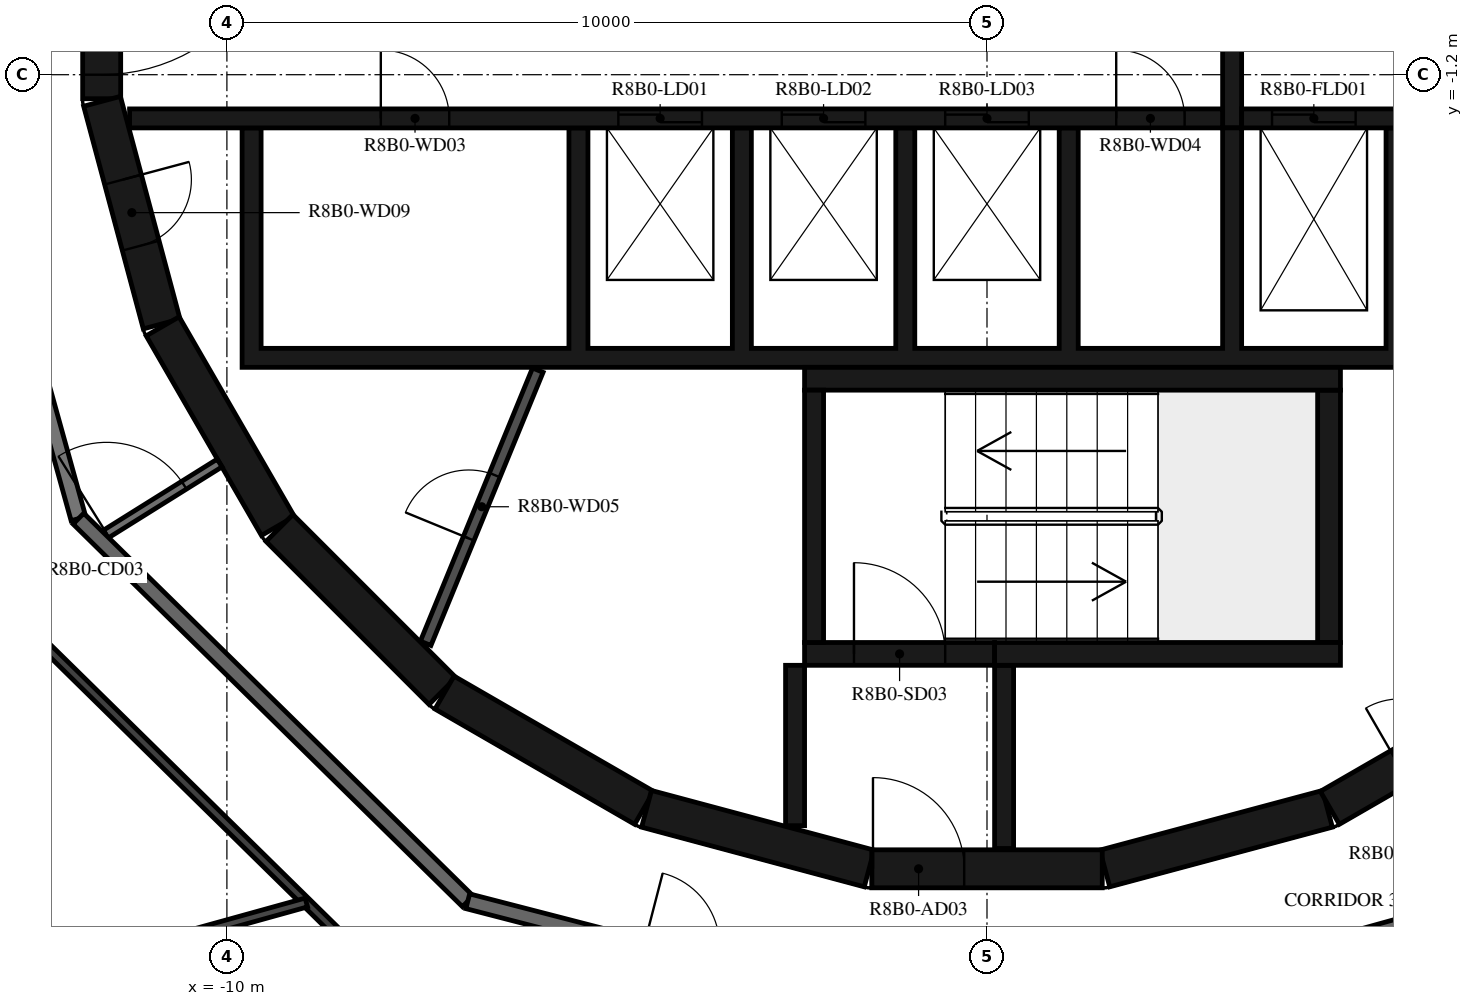
"""IFC4 building model, lengths in metres.
Left out: names, types, materials, properties, quantities, classifications, styles, units other than length and angle.
Written with IfcOpenShell. Run it as: python <this file> out.ifc"""

import sys

from ifc_helpers import new_model, si_unit, direction, frame, frame_2d, origin, place, context, subcontext, project, spatial, polyline, rectangle, outline, extrude, element, fill, save


model = new_model("IFC4")
c1 = context("Model", 3, precision=1e-05, world=origin(), true_north=direction((0.0, 1.0)))
c2 = subcontext(c1, "Body", "Model", "MODEL_VIEW")
j1 = project(units=[si_unit("LENGTHUNIT", "METRE"), si_unit("PLANEANGLEUNIT", "RADIAN")], contexts=[c1])
p1 = place(None, origin())
s1 = spatial("IfcSite", under=j1, at=p1, CompositionType="ELEMENT")
p2 = place(p1, origin())
s2 = spatial("IfcBuilding", under=s1, at=p2, CompositionType="ELEMENT")
p3 = place(p2, frame((0.0, 0.0, 312.2)))
s3 = spatial("IfcBuildingStorey", under=s2, at=p3, CompositionType="ELEMENT", Elevation=312.2)
p4 = place(p3, frame((1.55, -11.643, 0.0), z_axis=(0.0, 0.0, 1.0), x_axis=(0.965948410781, 0.258734743916, 0.0)))
e1 = element("IfcWall", 1, at=p4, inside=s3, PredefinedType="SHEAR", context=c2, shape_type="SweptSolid", body=[
    extrude(rectangle(XDim=3.033, YDim=0.5, at=frame_2d((1.516, 0.0))), origin(), (0.0, 0.0, 1.0), 3.12),
])
p5 = place(p3, frame((4.51, -10.845, 0.0), z_axis=(0.0, 0.0, 1.0), x_axis=(0.865975092491, 0.500087131594, 0.0)))
e2 = element("IfcWall", 2, at=p5, inside=s3, PredefinedType="SHEAR", context=c2, shape_type="SweptSolid", body=[
    extrude(rectangle(XDim=3.033, YDim=0.5, at=frame_2d((1.516, 0.0))), origin(), (0.0, 0.0, 1.0), 3.12),
])
p6 = place(p5, frame((1.066, 0.0, 0.0)))
e3 = element("IfcOpeningElement", 3, at=p6, cuts=e2, PredefinedType="OPENING", context=c2, shape_type="SweptSolid", body=[
    extrude(rectangle(XDim=0.9, YDim=2.1, at=frame_2d((0.45, 1.05))), frame((0.0, 0.26, 0.0), z_axis=(0.0, -1.0, 0.0), x_axis=(1.0, 0.0, 0.0)), (0.0, 0.0, 1.0), 0.52),
])
p7 = place(p3, frame((-11.647, 1.516, 0.0), z_axis=(0.0, 0.0, 1.0), x_axis=(0.0, -1.0, 0.0)))
e4 = element("IfcWall", 4, at=p7, inside=s3, PredefinedType="SHEAR", context=c2, shape_type="SweptSolid", body=[
    extrude(rectangle(XDim=3.033, YDim=0.5, at=frame_2d((1.516, 0.0))), origin(), (0.0, 0.0, 1.0), 3.12),
])
p8 = place(p7, frame((0.316, 0.0, 0.0)))
e5 = element("IfcOpeningElement", 5, at=p8, cuts=e4, PredefinedType="OPENING", context=c2, shape_type="SweptSolid", body=[
    extrude(rectangle(XDim=2.4, YDim=2.1, at=frame_2d((1.2, 1.05))), frame((0.0, 0.26, 0.0), z_axis=(0.0, -1.0, 0.0), x_axis=(1.0, 0.0, 0.0)), (0.0, 0.0, 1.0), 0.52),
])
p9 = place(p3, frame((-11.643, -1.55, 0.0), z_axis=(0.0, 0.0, 1.0), x_axis=(0.258734743916, -0.965948410781, 0.0)))
e6 = element("IfcWall", 6, at=p9, inside=s3, PredefinedType="SHEAR", context=c2, shape_type="SweptSolid", body=[
    extrude(rectangle(XDim=3.033, YDim=0.5, at=frame_2d((1.516, 0.0))), origin(), (0.0, 0.0, 1.0), 3.12),
])
p10 = place(p9, frame((1.066, 0.0, 0.0)))
e7 = element("IfcOpeningElement", 7, at=p10, cuts=e6, PredefinedType="OPENING", context=c2, shape_type="SweptSolid", body=[
    extrude(rectangle(XDim=0.9, YDim=2.1, at=frame_2d((0.45, 1.05))), frame((0.0, 0.26, 0.0), z_axis=(0.0, -1.0, 0.0), x_axis=(1.0, 0.0, 0.0)), (0.0, 0.0, 1.0), 0.52),
])
p11 = place(p3, frame((-10.845, -4.51, 0.0), z_axis=(0.0, 0.0, 1.0), x_axis=(0.500087131594, -0.865975092491, 0.0)))
e8 = element("IfcWall", 8, at=p11, inside=s3, PredefinedType="SHEAR", context=c2, shape_type="SweptSolid", body=[
    extrude(rectangle(XDim=3.033, YDim=0.5, at=frame_2d((1.516, 0.0))), origin(), (0.0, 0.0, 1.0), 3.12),
])
p12 = place(p3, frame((-9.308, -7.164, 0.0), z_axis=(0.0, 0.0, 1.0), x_axis=(0.707106781187, -0.707106781187, 0.0)))
e9 = element("IfcWall", 9, at=p12, inside=s3, PredefinedType="SHEAR", context=c2, shape_type="SweptSolid", body=[
    extrude(rectangle(XDim=3.032, YDim=0.5, at=frame_2d((1.516, 0.0))), origin(), (0.0, 0.0, 1.0), 3.12),
])
for number, where, z_axis, x_axis in (
    (10, (-7.137, -9.329, 0.0), (0.0, 0.0, 1.0), (0.866, -0.5, 0.0)),
    (11, (-4.479, -10.858, 0.0), (0.0, 0.0, 1.0), (0.966, -0.259, 0.0)),
):
    element("IfcWall", number, at=place(p3, frame(where, z_axis=z_axis, x_axis=x_axis)), inside=s3, PredefinedType="SHEAR", context=c2, shape_type="SweptSolid", body=[
        extrude(rectangle(XDim=3.033, YDim=0.5, at=frame_2d((1.516, 0.0))), origin(), (0.0, 0.0, 1.0), 3.12),
    ])
p13 = place(p3, frame((-1.516, -11.647, 0.0), z_axis=(0.0, 0.0, 1.0), x_axis=(1.0, 0.0, 0.0)))
e12 = element("IfcWall", 12, at=p13, inside=s3, PredefinedType="SHEAR", context=c2, shape_type="SweptSolid", body=[
    extrude(rectangle(XDim=3.033, YDim=0.5, at=frame_2d((1.516, 0.0))), origin(), (0.0, 0.0, 1.0), 3.12),
])
p14 = place(p13, frame((0.016, 0.0, 0.0)))
e13 = element("IfcOpeningElement", 13, at=p14, cuts=e12, PredefinedType="OPENING", context=c2, shape_type="SweptSolid", body=[
    extrude(rectangle(XDim=1.2, YDim=2.1, at=frame_2d((0.6, 1.05))), frame((0.0, 0.26, 0.0), z_axis=(0.0, -1.0, 0.0), x_axis=(1.0, 0.0, 0.0)), (0.0, 0.0, 1.0), 0.52),
])
p15 = place(p3, frame((-2.275, -8.67, 0.0), z_axis=(0.0, 0.0, 1.0), x_axis=(0.0, 1.0, 0.0)))
e14 = element("IfcWall", 14, at=p15, inside=s3, PredefinedType="SHEAR", context=c2, shape_type="SweptSolid", body=[
    extrude(rectangle(XDim=3.32, YDim=0.25, at=frame_2d((1.66, 0.0))), origin(), (0.0, 0.0, 1.0), 3.12),
])
p16 = place(p3, frame((-2.4, -5.2, 0.0), z_axis=(0.0, 0.0, 1.0), x_axis=(1.0, 0.0, 0.0)))
e15 = element("IfcWall", 15, at=p16, inside=s3, PredefinedType="SHEAR", context=c2, shape_type="SweptSolid", body=[
    extrude(rectangle(XDim=7.05, YDim=0.3, at=frame_2d((3.525, 0.0))), origin(), (0.0, 0.0, 1.0), 3.12),
])
p17 = place(p3, frame((4.5, -8.67, 0.0), z_axis=(0.0, 0.0, 1.0), x_axis=(0.0, 1.0, 0.0)))
e16 = element("IfcWall", 16, at=p17, inside=s3, PredefinedType="SHEAR", context=c2, shape_type="SweptSolid", body=[
    extrude(rectangle(XDim=3.32, YDim=0.3, at=frame_2d((1.66, 0.0))), origin(), (0.0, 0.0, 1.0), 3.12),
])
p18 = place(p3, frame((0.1, -8.82, 0.0), z_axis=(0.0, 0.0, 1.0), x_axis=(1.0, 0.0, 0.0)))
e17 = element("IfcWall", 17, at=p18, inside=s3, PredefinedType="SHEAR", context=c2, shape_type="SweptSolid", body=[
    extrude(rectangle(XDim=4.55, YDim=0.3, at=frame_2d((2.275, 0.0))), origin(), (0.0, 0.0, 1.0), 3.12),
])
p19 = place(p3, frame((-2.4, -8.82, 0.0), z_axis=(0.0, 0.0, 1.0), x_axis=(1.0, 0.0, 0.0)))
e18 = element("IfcWall", 18, at=p19, inside=s3, PredefinedType="SHEAR", context=c2, shape_type="SweptSolid", body=[
    extrude(rectangle(XDim=2.5, YDim=0.3, at=frame_2d((1.25, 0.0))), origin(), (0.0, 0.0, 1.0), 3.12),
])
p20 = place(p19, frame((0.65, 0.0, 0.0)))
e19 = element("IfcOpeningElement", 19, at=p20, cuts=e18, PredefinedType="OPENING", context=c2, shape_type="SweptSolid", body=[
    extrude(rectangle(XDim=1.2, YDim=2.1, at=frame_2d((0.6, 1.05))), frame((0.0, 0.16, 0.0), z_axis=(0.0, -1.0, 0.0), x_axis=(1.0, 0.0, 0.0)), (0.0, 0.0, 1.0), 0.32),
])
p21 = place(p3, frame((-2.525, -8.97, 0.0), z_axis=(0.0, 0.0, 1.0), x_axis=(0.0, -1.0, 0.0)))
e20 = element("IfcWall", 20, at=p21, inside=s3, PredefinedType="SHEAR", context=c2, shape_type="SweptSolid", body=[
    extrude(rectangle(XDim=2.11, YDim=0.25, at=frame_2d((1.055, 0.0))), origin(), (0.0, 0.0, 1.0), 3.12),
])
p22 = place(p3, frame((0.225, -8.97, 0.0), z_axis=(0.0, 0.0, 1.0), x_axis=(0.0, -1.0, 0.0)))
e21 = element("IfcWall", 21, at=p22, inside=s3, PredefinedType="SHEAR", context=c2, shape_type="SweptSolid", body=[
    extrude(rectangle(XDim=2.41, YDim=0.25, at=frame_2d((1.205, 0.0))), origin(), (0.0, 0.0, 1.0), 3.12),
])
p23 = place(p3, origin())
e22 = element("IfcWall", 22, at=p23, inside=s3, PredefinedType="SHEAR", context=c2, shape_type="SweptSolid", body=[
    extrude(outline(polyline([(9.8, -5.05), (9.8, -4.8), (9.8, -1.9), (9.55, -1.9), (9.55, -4.8), (7.65, -4.8), (7.65, -1.9), (7.4, -1.9), (7.4, -4.8), (5.5, -4.8), (5.5, -1.9), (5.25, -1.9), (5.25, -4.8), (3.35, -4.8), (3.35, -1.9), (3.1, -1.9), (3.1, -4.8), (1.2, -4.8), (1.2, -1.9), (0.95, -1.9), (0.95, -4.8), (-0.95, -4.8), (-0.95, -1.9), (-1.2, -1.9), (-1.2, -4.8), (-3.1, -4.8), (-3.1, -1.9), (-3.35, -1.9), (-3.35, -4.8), (-5.25, -4.8), (-5.25, -1.9), (-5.5, -1.9), (-5.5, -4.8), (-9.55, -4.8), (-9.55, -1.9), (-9.8, -1.9), (-9.8, -4.8), (-9.8, -5.05), (9.8, -5.05)])), origin(), (0.0, 0.0, 1.0), 3.12),
])
p24 = place(p3, frame((-11.28, -1.775, 0.0), z_axis=(0.0, 0.0, 1.0), x_axis=(1.0, 0.0, 0.0)))
e23 = element("IfcWall", 23, at=p24, inside=s3, PredefinedType="SHEAR", context=c2, shape_type="SweptSolid", body=[
    extrude(rectangle(XDim=14.38, YDim=0.25, at=frame_2d((7.19, 0.0))), origin(), (0.0, 0.0, 1.0), 3.12),
])
p25 = place(p24, frame((6.43, 0.0, 0.0)))
e24 = element("IfcOpeningElement", 24, at=p25, cuts=e23, PredefinedType="OPENING", context=c2, shape_type="SweptSolid", body=[
    extrude(rectangle(XDim=1.1, YDim=2.1, at=frame_2d((0.55, 1.05))), frame((0.0, 0.135, 0.0), z_axis=(0.0, -1.0, 0.0), x_axis=(1.0, 0.0, 0.0)), (0.0, 0.0, 1.0), 0.27),
])
p26 = place(p24, frame((8.58, 0.0, 0.0)))
e25 = element("IfcOpeningElement", 25, at=p26, cuts=e23, PredefinedType="OPENING", context=c2, shape_type="SweptSolid", body=[
    extrude(rectangle(XDim=1.1, YDim=2.1, at=frame_2d((0.55, 1.05))), frame((0.0, 0.135, 0.0), z_axis=(0.0, -1.0, 0.0), x_axis=(1.0, 0.0, 0.0)), (0.0, 0.0, 1.0), 0.27),
])
p27 = place(p24, frame((10.73, 0.0, 0.0)))
e26 = element("IfcOpeningElement", 26, at=p27, cuts=e23, PredefinedType="OPENING", context=c2, shape_type="SweptSolid", body=[
    extrude(rectangle(XDim=1.1, YDim=2.1, at=frame_2d((0.55, 1.05))), frame((0.0, 0.135, 0.0), z_axis=(0.0, -1.0, 0.0), x_axis=(1.0, 0.0, 0.0)), (0.0, 0.0, 1.0), 0.27),
])
p28 = place(p24, frame((3.305, 0.0, 0.0)))
e27 = element("IfcOpeningElement", 27, at=p28, cuts=e23, PredefinedType="OPENING", context=c2, shape_type="SweptSolid", body=[
    extrude(rectangle(XDim=0.9, YDim=2.1, at=frame_2d((0.45, 1.05))), frame((0.0, 0.135, 0.0), z_axis=(0.0, -1.0, 0.0), x_axis=(1.0, 0.0, 0.0)), (0.0, 0.0, 1.0), 0.27),
])
p29 = place(p24, frame((12.98, 0.0, 0.0)))
e28 = element("IfcOpeningElement", 28, at=p29, cuts=e23, PredefinedType="OPENING", context=c2, shape_type="SweptSolid", body=[
    extrude(rectangle(XDim=0.9, YDim=2.1, at=frame_2d((0.45, 1.05))), frame((0.0, 0.135, 0.0), z_axis=(0.0, -1.0, 0.0), x_axis=(1.0, 0.0, 0.0)), (0.0, 0.0, 1.0), 0.27),
])
p30 = place(p3, frame((3.35, -1.775, 0.0), z_axis=(0.0, 0.0, 1.0), x_axis=(1.0, 0.0, 0.0)))
e29 = element("IfcWall", 29, at=p30, inside=s3, PredefinedType="SHEAR", context=c2, shape_type="SweptSolid", body=[
    extrude(rectangle(XDim=7.93, YDim=0.25, at=frame_2d((3.965, 0.0))), origin(), (0.0, 0.0, 1.0), 3.12),
])
p31 = place(p30, frame((0.4, 0.0, 0.0)))
e30 = element("IfcOpeningElement", 30, at=p31, cuts=e29, PredefinedType="OPENING", context=c2, shape_type="SweptSolid", body=[
    extrude(rectangle(XDim=1.1, YDim=2.4, at=frame_2d((0.55, 1.2))), frame((0.0, 0.135, 0.0), z_axis=(0.0, -1.0, 0.0), x_axis=(1.0, 0.0, 0.0)), (0.0, 0.0, 1.0), 0.27),
])
p32 = place(p30, frame((2.55, 0.0, 0.0)))
e31 = element("IfcOpeningElement", 31, at=p32, cuts=e29, PredefinedType="OPENING", context=c2, shape_type="SweptSolid", body=[
    extrude(rectangle(XDim=1.1, YDim=2.4, at=frame_2d((0.55, 1.2))), frame((0.0, 0.135, 0.0), z_axis=(0.0, -1.0, 0.0), x_axis=(1.0, 0.0, 0.0)), (0.0, 0.0, 1.0), 0.27),
])
p33 = place(p30, frame((4.7, 0.0, 0.0)))
e32 = element("IfcOpeningElement", 32, at=p33, cuts=e29, PredefinedType="OPENING", context=c2, shape_type="SweptSolid", body=[
    extrude(rectangle(XDim=1.1, YDim=2.4, at=frame_2d((0.55, 1.2))), frame((0.0, 0.135, 0.0), z_axis=(0.0, -1.0, 0.0), x_axis=(1.0, 0.0, 0.0)), (0.0, 0.0, 1.0), 0.27),
])
p34 = place(p3, frame((3.225, -1.9, 0.0), z_axis=(0.0, 0.0, 1.0), x_axis=(0.0, 1.0, 0.0)))
e33 = element("IfcWall", 33, at=p34, inside=s3, PredefinedType="SHEAR", context=c2, shape_type="SweptSolid", body=[
    extrude(rectangle(XDim=3.8, YDim=0.25, at=frame_2d((1.9, 0.0))), origin(), (0.0, 0.0, 1.0), 3.12),
])
p35 = place(p3, frame((-7.385, -8.681, 0.0), z_axis=(0.0, 0.0, 1.0), x_axis=(0.379804590409, 0.925066739811, 0.0)))
e34 = element("IfcWall", 34, at=p35, inside=s3, PredefinedType="PARTITIONING", context=c2, shape_type="SweptSolid", body=[
    extrude(rectangle(XDim=3.885, YDim=0.15, at=frame_2d((1.942, 0.0))), origin(), (0.0, 0.0, 1.0), 3.12),
])
p36 = place(p35, frame((1.493, 0.0, 0.0)))
e35 = element("IfcOpeningElement", 35, at=p36, cuts=e34, PredefinedType="OPENING", context=c2, shape_type="SweptSolid", body=[
    extrude(rectangle(XDim=0.9, YDim=2.1, at=frame_2d((0.45, 1.05))), frame((0.0, 0.085, 0.0), z_axis=(0.0, -1.0, 0.0), x_axis=(1.0, 0.0, 0.0)), (0.0, 0.0, 1.0), 0.17),
])
p37 = place(p3, frame((-11.687, -7.303, 0.0), z_axis=(0.0, 0.0, 1.0), x_axis=(0.848064094072, 0.529893661357, 0.0)))
e36 = element("IfcWall", 36, at=p37, inside=s3, PredefinedType="PARTITIONING", context=c2, shape_type="SweptSolid", body=[
    extrude(rectangle(XDim=1.876, YDim=0.12, at=frame_2d((0.938, 0.0))), origin(), (0.0, 0.0, 1.0), 3.12),
])
p38 = place(p37, frame((0.125, 0.0, 0.0)))
e37 = element("IfcOpeningElement", 37, at=p38, cuts=e36, PredefinedType="OPENING", context=c2, shape_type="SweptSolid", body=[
    extrude(rectangle(XDim=1.2, YDim=2.1, at=frame_2d((0.6, 1.05))), frame((0.0, 0.07, 0.0), z_axis=(0.0, -1.0, 0.0), x_axis=(1.0, 0.0, 0.0)), (0.0, 0.0, 1.0), 0.14),
])
p39 = place(p3, frame((-13.872, -0.121, 0.0), z_axis=(0.0, 0.0, 1.0), x_axis=(0.267254575108, -0.963625960674, 0.0)))
e38 = element("IfcWall", 38, at=p39, inside=s3, PredefinedType="STANDARD", context=c2, shape_type="SweptSolid", body=[
    extrude(rectangle(XDim=7.181, YDim=0.2, at=frame_2d((3.591, 0.0))), origin(), (0.0, 0.0, 1.0), 3.12),
])
p40 = place(p3, frame((-11.953, -7.041, 0.0), z_axis=(0.0, 0.0, 1.0), x_axis=(0.713250549143, -0.70090916255, 0.0)))
e39 = element("IfcWall", 39, at=p40, inside=s3, PredefinedType="STANDARD", context=c2, shape_type="SweptSolid", body=[
    extrude(rectangle(XDim=7.181, YDim=0.2, at=frame_2d((3.59, 0.0))), origin(), (0.0, 0.0, 1.0), 3.12),
])
p41 = place(p3, frame((-6.831, -12.074, 0.0), z_axis=(0.0, 0.0, 1.0), x_axis=(0.968144780225, -0.250391063186, 0.0)))
e40 = element("IfcWall", 40, at=p41, inside=s3, PredefinedType="STANDARD", context=c2, shape_type="SweptSolid", body=[
    extrude(rectangle(XDim=7.181, YDim=0.2, at=frame_2d((3.591, 0.0))), origin(), (0.0, 0.0, 1.0), 3.12),
])
p42 = place(p41, frame((2.39, 0.0, 0.0)))
e41 = element("IfcOpeningElement", 41, at=p42, cuts=e40, PredefinedType="OPENING", context=c2, shape_type="SweptSolid", body=[
    extrude(rectangle(XDim=1.0, YDim=2.1, at=frame_2d((0.5, 1.05))), frame((0.0, 0.11, 0.0), z_axis=(0.0, -1.0, 0.0), x_axis=(1.0, 0.0, 0.0)), (0.0, 0.0, 1.0), 0.22),
])
p43 = place(p41, frame((5.69, 0.0, 0.0)))
e42 = element("IfcOpeningElement", 42, at=p43, cuts=e40, PredefinedType="OPENING", context=c2, shape_type="SweptSolid", body=[
    extrude(rectangle(XDim=1.0, YDim=2.1, at=frame_2d((0.5, 1.05))), frame((0.0, 0.11, 0.0), z_axis=(0.0, -1.0, 0.0), x_axis=(1.0, 0.0, 0.0)), (0.0, 0.0, 1.0), 0.22),
])
p44 = place(p3, frame((0.121, -13.872, 0.0), z_axis=(0.0, 0.0, 1.0), x_axis=(0.963625960674, 0.267254575108, 0.0)))
e43 = element("IfcWall", 43, at=p44, inside=s3, PredefinedType="STANDARD", context=c2, shape_type="SweptSolid", body=[
    extrude(rectangle(XDim=7.181, YDim=0.2, at=frame_2d((3.591, 0.0))), origin(), (0.0, 0.0, 1.0), 3.12),
])
p45 = place(p3, frame((-13.291, -7.829, 0.0), z_axis=(0.0, 0.0, 1.0), x_axis=(0.71326209988, -0.700897408238, 0.0)))
e44 = element("IfcWall", 44, at=p45, inside=s3, PredefinedType="PARTITIONING", context=c2, shape_type="SweptSolid", body=[
    extrude(rectangle(XDim=7.029, YDim=0.12, at=frame_2d((3.515, 0.0))), origin(), (0.0, 0.0, 1.0), 3.12),
])
p46 = place(p3, frame((-14.066, -13.508, 0.0), z_axis=(0.0, 0.0, 1.0), x_axis=(0.963634530082, 0.267223674913, 0.0)))
e45 = element("IfcWall", 45, at=p46, inside=s3, PredefinedType="PARTITIONING", context=c2, shape_type="SweptSolid", body=[
    extrude(rectangle(XDim=5.304, YDim=0.12, at=frame_2d((2.652, 0.0))), origin(), (0.0, 0.0, 1.0), 2.73),
])
p47 = place(p20, origin())
e46 = element("IfcDoor", 46, at=p47, inside=s3, OperationType="SINGLE_SWING_LEFT", PredefinedType="DOOR", context=c2, shape_type="SweptSolid", body=[
    extrude(rectangle(XDim=1.2, YDim=2.1, at=frame_2d((0.6, 1.05))), frame((0.0, 0.025, 0.0), z_axis=(0.0, -1.0, 0.0), x_axis=(1.0, 0.0, 0.0)), (0.0, 0.0, 1.0), 0.05),
])
fill(e19, e46)
p48 = place(p14, origin())
e47 = element("IfcDoor", 47, at=p48, inside=s3, OperationType="SINGLE_SWING_RIGHT", PredefinedType="DOOR", context=c2, shape_type="SweptSolid", body=[
    extrude(rectangle(XDim=1.2, YDim=2.1, at=frame_2d((0.6, 1.05))), frame((0.0, 0.025, 0.0), z_axis=(0.0, -1.0, 0.0), x_axis=(1.0, 0.0, 0.0)), (0.0, 0.0, 1.0), 0.05),
])
fill(e13, e47)
p49 = place(p8, origin())
e48 = element("IfcDoor", 48, at=p49, inside=s3, OperationType="DOUBLE_DOOR_SINGLE_SWING", PredefinedType="DOOR", context=c2, shape_type="SweptSolid", body=[
    extrude(rectangle(XDim=2.4, YDim=2.1, at=frame_2d((1.2, 1.05))), frame((0.0, 0.025, 0.0), z_axis=(0.0, -1.0, 0.0), x_axis=(1.0, 0.0, 0.0)), (0.0, 0.0, 1.0), 0.05),
])
fill(e5, e48)
p50 = place(p25, origin())
e49 = element("IfcDoor", 49, at=p50, inside=s3, OperationType="DOUBLE_DOOR_SLIDING", PredefinedType="DOOR", context=c2, shape_type="SweptSolid", body=[
    extrude(rectangle(XDim=1.1, YDim=2.1, at=frame_2d((0.55, 1.05))), frame((0.0, 0.025, 0.0), z_axis=(0.0, -1.0, 0.0), x_axis=(1.0, 0.0, 0.0)), (0.0, 0.0, 1.0), 0.05),
])
fill(e24, e49)
p51 = place(p26, origin())
e50 = element("IfcDoor", 50, at=p51, inside=s3, OperationType="DOUBLE_DOOR_SLIDING", PredefinedType="DOOR", context=c2, shape_type="SweptSolid", body=[
    extrude(rectangle(XDim=1.1, YDim=2.1, at=frame_2d((0.55, 1.05))), frame((0.0, 0.025, 0.0), z_axis=(0.0, -1.0, 0.0), x_axis=(1.0, 0.0, 0.0)), (0.0, 0.0, 1.0), 0.05),
])
fill(e25, e50)
p52 = place(p27, origin())
e51 = element("IfcDoor", 51, at=p52, inside=s3, OperationType="DOUBLE_DOOR_SLIDING", PredefinedType="DOOR", context=c2, shape_type="SweptSolid", body=[
    extrude(rectangle(XDim=1.1, YDim=2.1, at=frame_2d((0.55, 1.05))), frame((0.0, 0.025, 0.0), z_axis=(0.0, -1.0, 0.0), x_axis=(1.0, 0.0, 0.0)), (0.0, 0.0, 1.0), 0.05),
])
fill(e26, e51)
p53 = place(p31, origin())
e52 = element("IfcDoor", 52, at=p53, inside=s3, OperationType="DOUBLE_DOOR_SLIDING", PredefinedType="DOOR", context=c2, shape_type="SweptSolid", body=[
    extrude(rectangle(XDim=1.1, YDim=2.4, at=frame_2d((0.55, 1.2))), frame((0.0, 0.025, 0.0), z_axis=(0.0, -1.0, 0.0), x_axis=(1.0, 0.0, 0.0)), (0.0, 0.0, 1.0), 0.05),
])
fill(e30, e52)
p54 = place(p28, origin())
e53 = element("IfcDoor", 53, at=p54, inside=s3, OperationType="SINGLE_SWING_LEFT", PredefinedType="DOOR", context=c2, shape_type="SweptSolid", body=[
    extrude(rectangle(XDim=0.9, YDim=2.1, at=frame_2d((0.45, 1.05))), frame((0.0, 0.025, 0.0), z_axis=(0.0, -1.0, 0.0), x_axis=(1.0, 0.0, 0.0)), (0.0, 0.0, 1.0), 0.05),
])
fill(e27, e53)
p55 = place(p29, origin())
e54 = element("IfcDoor", 54, at=p55, inside=s3, OperationType="SINGLE_SWING_RIGHT", PredefinedType="DOOR", context=c2, shape_type="SweptSolid", body=[
    extrude(rectangle(XDim=0.9, YDim=2.1, at=frame_2d((0.45, 1.05))), frame((0.0, 0.025, 0.0), z_axis=(0.0, -1.0, 0.0), x_axis=(1.0, 0.0, 0.0)), (0.0, 0.0, 1.0), 0.05),
])
fill(e28, e54)
p56 = place(p36, origin())
e55 = element("IfcDoor", 55, at=p56, inside=s3, OperationType="SINGLE_SWING_LEFT", PredefinedType="DOOR", context=c2, shape_type="SweptSolid", body=[
    extrude(rectangle(XDim=0.9, YDim=2.1, at=frame_2d((0.45, 1.05))), frame((0.0, 0.025, 0.0), z_axis=(0.0, -1.0, 0.0), x_axis=(1.0, 0.0, 0.0)), (0.0, 0.0, 1.0), 0.05),
])
fill(e35, e55)
p57 = place(p10, origin())
e56 = element("IfcDoor", 56, at=p57, inside=s3, OperationType="SINGLE_SWING_LEFT", PredefinedType="DOOR", context=c2, shape_type="SweptSolid", body=[
    extrude(rectangle(XDim=0.9, YDim=2.1, at=frame_2d((0.45, 1.05))), frame((0.0, 0.025, 0.0), z_axis=(0.0, -1.0, 0.0), x_axis=(1.0, 0.0, 0.0)), (0.0, 0.0, 1.0), 0.05),
])
fill(e7, e56)
p58 = place(p38, origin())
e57 = element("IfcDoor", 57, at=p58, inside=s3, OperationType="DOUBLE_DOOR_SINGLE_SWING", PredefinedType="DOOR", context=c2, shape_type="SweptSolid", body=[
    extrude(rectangle(XDim=1.2, YDim=2.1, at=frame_2d((0.6, 1.05))), frame((0.0, 0.025, 0.0), z_axis=(0.0, -1.0, 0.0), x_axis=(1.0, 0.0, 0.0)), (0.0, 0.0, 1.0), 0.05),
])
fill(e37, e57)
save(model, sys.argv[1])
